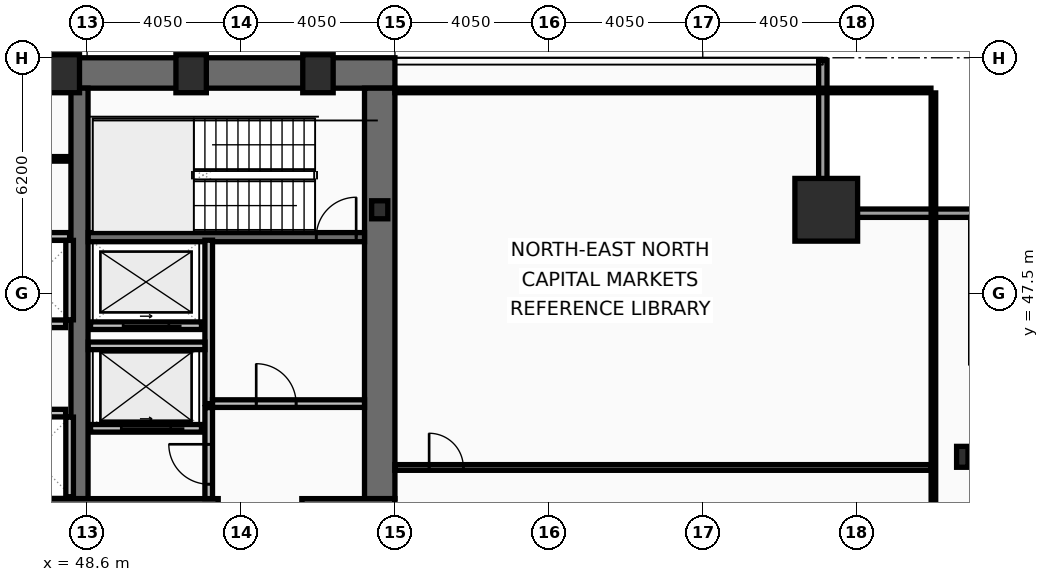
"""IFC4 building model, lengths in metres.
Left out: names, types, materials, properties, quantities, classifications, styles, units other than length and angle.
Written with IfcOpenShell. Run it as: python <this file> out.ifc"""

import sys

from ifc_helpers import new_model, si_unit, direction, frame, frame_2d, origin, origin_2d, place, context, subcontext, project, spatial, rectangle, hollow_rectangle, i_section, extrude, element, fill, save


model = new_model("IFC4")
c1 = context("Model", 3, precision=1e-05, world=origin(), true_north=direction((0.0, 1.0)))
c2 = subcontext(c1, "Body", "Model", "MODEL_VIEW")
j1 = project(units=[si_unit("LENGTHUNIT", "METRE"), si_unit("PLANEANGLEUNIT", "RADIAN")], contexts=[c1])
p1 = place(None, origin())
s1 = spatial("IfcSite", under=j1, at=p1, CompositionType="ELEMENT")
p2 = place(p1, origin())
s2 = spatial("IfcBuilding", under=s1, at=p2, CompositionType="ELEMENT")
p3 = place(p2, frame((0.0, 0.0, 53.8)))
s3 = spatial("IfcBuildingStorey", under=s2, at=p3, CompositionType="ELEMENT", Elevation=53.8)
p4 = place(p3, frame((16.2, 53.3, 0.0), z_axis=(0.0, 0.0, 1.0), x_axis=(1.0, 0.0, 0.0)))
e1 = element("IfcWall", 1, at=p4, inside=s3, PredefinedType="SHEAR", context=c2, shape_type="SweptSolid", body=[
    extrude(rectangle(XDim=40.5, YDim=0.8, at=frame_2d((20.25, 0.0))), origin(), (0.0, 0.0, 1.0), 3.82),
])
p5 = place(p3, frame((56.3, 52.9, 0.0), z_axis=(0.0, 0.0, 1.0), x_axis=(0.0, -1.0, 0.0)))
e2 = element("IfcWall", 2, at=p5, inside=s3, PredefinedType="SHEAR", context=c2, shape_type="SweptSolid", body=[
    extrude(rectangle(XDim=10.8, YDim=0.8, at=frame_2d((5.4, 0.0))), origin(), (0.0, 0.0, 1.0), 3.82),
])
p6 = place(p3, frame((48.4, 42.1, 0.0), z_axis=(0.0, 0.0, 1.0), x_axis=(0.0, 1.0, 0.0)))
e3 = element("IfcWall", 3, at=p6, inside=s3, PredefinedType="SHEAR", context=c2, shape_type="SweptSolid", body=[
    extrude(rectangle(XDim=10.8, YDim=0.45, at=frame_2d((5.4, 0.0))), origin(), (0.0, 0.0, 1.0), 3.82),
])
p7 = place(p3, frame((52.05, 41.7, 0.0), z_axis=(0.0, 0.0, 1.0), x_axis=(-1.0, 0.0, 0.0)))
e4 = element("IfcWall", 4, at=p7, inside=s3, PredefinedType="SHEAR", context=c2, shape_type="SweptSolid", body=[
    extrude(rectangle(XDim=11.3, YDim=0.8, at=frame_2d((5.65, 0.0))), origin(), (0.0, 0.0, 1.0), 3.82),
])
p8 = place(p3, frame((56.7, 41.7, 0.0), z_axis=(0.0, 0.0, 1.0), x_axis=(-1.0, 0.0, 0.0)))
e5 = element("IfcWall", 5, at=p8, inside=s3, PredefinedType="SHEAR", context=c2, shape_type="SweptSolid", body=[
    extrude(rectangle(XDim=2.45, YDim=0.8, at=frame_2d((1.225, 0.0))), origin(), (0.0, 0.0, 1.0), 3.82),
])
p9 = place(p3, frame((48.63, 48.98, 0.0), z_axis=(0.0, 0.0, 1.0), x_axis=(1.0, 0.0, 0.0)))
e6 = element("IfcWall", 6, at=p9, inside=s3, PredefinedType="SHEAR", context=c2, shape_type="SweptSolid", body=[
    extrude(rectangle(XDim=7.27, YDim=0.24, at=frame_2d((3.635, 0.0))), origin(), (0.0, 0.0, 1.0), 3.82),
])
p10 = place(p9, frame((6.0, 0.0, 0.0)))
e7 = element("IfcOpeningElement", 7, at=p10, cuts=e6, PredefinedType="OPENING", context=c2, shape_type="SweptSolid", body=[
    extrude(rectangle(XDim=1.05, YDim=2.15, at=frame_2d((0.525, 1.075))), frame((0.0, 0.13, 0.0), z_axis=(0.0, -1.0, 0.0), x_axis=(1.0, 0.0, 0.0)), (0.0, 0.0, 1.0), 0.26),
])
p11 = place(p3, frame((68.05, 49.7, 0.0), z_axis=(0.0, 0.0, 1.0), x_axis=(1.0, 0.0, 0.0)))
e8 = element("IfcColumn", 8, at=p11, inside=s3, PredefinedType="COLUMN", context=c2, shape_type="SweptSolid", body=[
    extrude(hollow_rectangle(XDim=1.65, YDim=1.65, WallThickness=0.075, at=origin_2d()), origin(), (0.0, 0.0, 1.0), 4.0),
])
for number, where, z_axis, x_axis in (
    (9, (48.0, 53.28, 0.0), (0.0, 0.0, 1.0), (1.0, 0.0, 0.0)),
    (10, (51.337, 53.28, 0.0), (0.0, 0.0, 1.0), (1.0, 0.0, 0.0)),
    (11, (54.675, 53.28, 0.0), (0.0, 0.0, 1.0), (1.0, 0.0, 0.0)),
):
    element("IfcColumn", number, at=place(p3, frame(where, z_axis=z_axis, x_axis=x_axis)), inside=s3, PredefinedType="COLUMN", context=c2, shape_type="SweptSolid", body=[
        extrude(hollow_rectangle(XDim=0.8, YDim=1.0, WallThickness=0.055, at=origin_2d()), origin(), (0.0, 0.0, 1.0), 4.0),
    ])
p12 = place(p3, frame((71.63, 43.2, 0.0), z_axis=(0.0, 0.0, 1.0), x_axis=(1.0, 0.0, 0.0)))
e12 = element("IfcColumn", 12, at=p12, inside=s3, PredefinedType="COLUMN", context=c2, shape_type="SweptSolid", body=[
    extrude(i_section(OverallWidth=0.3, OverallDepth=0.55, WebThickness=0.015, FlangeThickness=0.029, at=origin_2d()), origin(), (0.0, 0.0, 1.0), 4.0),
])
p13 = place(p3, frame((56.3, 49.7, 0.0), z_axis=(0.0, 0.0, 1.0), x_axis=(1.0, 0.0, 0.0)))
e13 = element("IfcColumn", 13, at=p13, inside=s3, PredefinedType="COLUMN", context=c2, shape_type="SweptSolid", body=[
    extrude(i_section(OverallWidth=0.424, OverallDepth=0.474, WebThickness=0.048, FlangeThickness=0.077, at=origin_2d()), origin(), (0.0, 0.0, 1.0), 4.0),
])
p14 = place(p3, frame((67.96, 53.63, 0.0), z_axis=(0.0, 0.0, 1.0), x_axis=(0.0, -1.0, 0.0)))
e14 = element("IfcWall", 14, at=p14, inside=s3, PredefinedType="SOLIDWALL", context=c2, shape_type="SweptSolid", body=[
    extrude(rectangle(XDim=3.91, YDim=0.22, at=frame_2d((1.955, 0.0))), origin(), (0.0, 0.0, 1.0), 3.16),
])
p15 = place(p3, frame((67.85, 49.61, 0.0), z_axis=(0.0, 0.0, 1.0), x_axis=(1.0, 0.0, 0.0)))
e15 = element("IfcWall", 15, at=p15, inside=s3, PredefinedType="SOLIDWALL", context=c2, shape_type="SweptSolid", body=[
    extrude(rectangle(XDim=4.22, YDim=0.22, at=frame_2d((2.11, 0.0))), origin(), (0.0, 0.0, 1.0), 3.16),
])
p16 = place(p3, frame((51.61, 43.95, 0.0), z_axis=(0.0, 0.0, 1.0), x_axis=(-1.0, 0.0, 0.0)))
e16 = element("IfcWall", 16, at=p16, inside=s3, PredefinedType="PARTITIONING", context=c2, shape_type="SweptSolid", body=[
    extrude(rectangle(XDim=2.92, YDim=0.2, at=frame_2d((1.46, 0.0))), origin(), (0.0, 0.0, 1.0), 3.82),
])
p17 = place(p16, frame((0.81, 0.0, 0.0)))
e17 = element("IfcOpeningElement", 17, at=p17, cuts=e16, PredefinedType="OPENING", context=c2, shape_type="SweptSolid", body=[
    extrude(rectangle(XDim=1.3, YDim=2.18, at=frame_2d((0.65, 1.09))), frame((0.0, 0.11, 0.0), z_axis=(0.0, -1.0, 0.0), x_axis=(1.0, 0.0, 0.0)), (0.0, 0.0, 1.0), 0.22),
])
p18 = place(p3, frame((51.61, 46.65, 0.0), z_axis=(0.0, 0.0, 1.0), x_axis=(-1.0, 0.0, 0.0)))
e18 = element("IfcWall", 18, at=p18, inside=s3, PredefinedType="PARTITIONING", context=c2, shape_type="SweptSolid", body=[
    extrude(rectangle(XDim=2.92, YDim=0.2, at=frame_2d((1.46, 0.0))), origin(), (0.0, 0.0, 1.0), 3.82),
])
p19 = place(p18, frame((0.86, 0.0, 0.0)))
e19 = element("IfcOpeningElement", 19, at=p19, cuts=e18, PredefinedType="OPENING", context=c2, shape_type="SweptSolid", body=[
    extrude(rectangle(XDim=1.2, YDim=2.18, at=frame_2d((0.6, 1.09))), frame((0.0, 0.11, 0.0), z_axis=(0.0, -1.0, 0.0), x_axis=(1.0, 0.0, 0.0)), (0.0, 0.0, 1.0), 0.22),
])
p20 = place(p3, frame((51.8, 44.6, 0.0), z_axis=(0.0, 0.0, 1.0), x_axis=(0.0, 1.0, 0.0)))
e20 = element("IfcWall", 20, at=p20, inside=s3, PredefinedType="PARTITIONING", context=c2, shape_type="SweptSolid", body=[
    extrude(rectangle(XDim=4.3, YDim=0.2, at=frame_2d((2.15, 0.0))), origin(), (0.0, 0.0, 1.0), 3.82),
])
p21 = place(p3, frame((51.9, 44.6, 0.0), z_axis=(0.0, 0.0, 1.0), x_axis=(1.0, 0.0, 0.0)))
e21 = element("IfcWall", 21, at=p21, inside=s3, PredefinedType="PARTITIONING", context=c2, shape_type="SweptSolid", body=[
    extrude(rectangle(XDim=4.0, YDim=0.2, at=frame_2d((2.0, 0.0))), origin(), (0.0, 0.0, 1.0), 3.82),
])
p22 = place(p21, frame((1.15, 0.0, 0.0)))
e22 = element("IfcOpeningElement", 22, at=p22, cuts=e21, PredefinedType="OPENING", context=c2, shape_type="SweptSolid", body=[
    extrude(rectangle(XDim=1.05, YDim=2.15, at=frame_2d((0.525, 1.075))), frame((0.0, 0.11, 0.0), z_axis=(0.0, -1.0, 0.0), x_axis=(1.0, 0.0, 0.0)), (0.0, 0.0, 1.0), 0.22),
])
p23 = place(p3, frame((48.63, 46.12, 0.0), z_axis=(0.0, 0.0, 1.0), x_axis=(1.0, 0.0, 0.0)))
e23 = element("IfcWall", 23, at=p23, inside=s3, PredefinedType="PARTITIONING", context=c2, shape_type="SweptSolid", body=[
    extrude(rectangle(XDim=3.07, YDim=0.2, at=frame_2d((1.535, 0.0))), origin(), (0.0, 0.0, 1.0), 3.82),
])
p24 = place(p3, frame((51.8, 42.1, 0.0), z_axis=(0.0, 0.0, 1.0), x_axis=(0.0, 1.0, 0.0)))
e24 = element("IfcWall", 24, at=p24, inside=s3, PredefinedType="PARTITIONING", context=c2, shape_type="SweptSolid", body=[
    extrude(rectangle(XDim=2.395, YDim=0.2, at=frame_2d((1.198, 0.0))), origin(), (0.0, 0.0, 1.0), 3.82),
])
p25 = place(p24, frame((0.38, 0.0, 0.0)))
e25 = element("IfcOpeningElement", 25, at=p25, cuts=e24, PredefinedType="OPENING", context=c2, shape_type="SweptSolid", body=[
    extrude(rectangle(XDim=1.05, YDim=2.15, at=frame_2d((0.525, 1.075))), frame((0.0, 0.11, 0.0), z_axis=(0.0, -1.0, 0.0), x_axis=(1.0, 0.0, 0.0)), (0.0, 0.0, 1.0), 0.22),
])
p26 = place(p3, frame((41.825, 46.7, 0.0), z_axis=(0.0, 0.0, 1.0), x_axis=(1.0, 0.0, 0.0)))
e26 = element("IfcWall", 26, at=p26, inside=s3, PredefinedType="PARTITIONING", context=c2, shape_type="SweptSolid", body=[
    extrude(rectangle(XDim=6.21, YDim=0.2, at=frame_2d((3.105, 0.0))), origin(), (0.0, 0.0, 1.0), 3.82),
])
p27 = place(p3, frame((48.14, 46.805, 0.0), z_axis=(0.0, 0.0, 1.0), x_axis=(0.0, 1.0, 0.0)))
e27 = element("IfcWall", 27, at=p27, inside=s3, PredefinedType="PARTITIONING", context=c2, shape_type="SweptSolid", body=[
    extrude(rectangle(XDim=2.09, YDim=0.2, at=frame_2d((1.045, 0.0))), origin(), (0.0, 0.0, 1.0), 3.82),
])
p28 = place(p3, frame((41.825, 44.35, 0.0), z_axis=(0.0, 0.0, 1.0), x_axis=(1.0, 0.0, 0.0)))
e28 = element("IfcWall", 28, at=p28, inside=s3, PredefinedType="PARTITIONING", context=c2, shape_type="SweptSolid", body=[
    extrude(rectangle(XDim=6.21, YDim=0.2, at=frame_2d((3.105, 0.0))), origin(), (0.0, 0.0, 1.0), 3.82),
])
p29 = place(p3, frame((48.14, 42.15, 0.0), z_axis=(0.0, 0.0, 1.0), x_axis=(0.0, 1.0, 0.0)))
e29 = element("IfcWall", 29, at=p29, inside=s3, PredefinedType="PARTITIONING", context=c2, shape_type="SweptSolid", body=[
    extrude(rectangle(XDim=2.095, YDim=0.2, at=frame_2d((1.048, 0.0))), origin(), (0.0, 0.0, 1.0), 3.82),
])
p30 = place(p3, frame((40.58, 52.86, 0.0), z_axis=(0.0, 0.0, 1.0), x_axis=(1.0, 0.0, 0.0)))
e30 = element("IfcWall", 30, at=p30, inside=s3, PredefinedType="PARTITIONING", context=c2, shape_type="SweptSolid", body=[
    extrude(rectangle(XDim=7.56, YDim=0.12, at=frame_2d((3.78, 0.0))), origin(), (0.0, 0.0, 1.0), 3.82),
])
p31 = place(p3, frame((40.58, 49.0, 0.0), z_axis=(0.0, 0.0, 1.0), x_axis=(1.0, 0.0, 0.0)))
e31 = element("IfcWall", 31, at=p31, inside=s3, PredefinedType="PARTITIONING", context=c2, shape_type="SweptSolid", body=[
    extrude(rectangle(XDim=7.56, YDim=0.2, at=frame_2d((3.78, 0.0))), origin(), (0.0, 0.0, 1.0), 3.82),
])
p32 = place(p31, frame((0.16, 0.0, 0.0)))
e32 = element("IfcOpeningElement", 32, at=p32, cuts=e31, PredefinedType="OPENING", context=c2, shape_type="SweptSolid", body=[
    extrude(rectangle(XDim=0.95, YDim=2.1, at=frame_2d((0.475, 1.05))), frame((0.0, 0.11, 0.0), z_axis=(0.0, -1.0, 0.0), x_axis=(1.0, 0.0, 0.0)), (0.0, 0.0, 1.0), 0.22),
])
p33 = place(p3, frame((40.63, 51.04, 0.0), z_axis=(0.0, 0.0, 1.0), x_axis=(1.0, 0.0, 0.0)))
e33 = element("IfcWall", 33, at=p33, inside=s3, PredefinedType="PARTITIONING", context=c2, shape_type="SweptSolid", body=[
    extrude(rectangle(XDim=7.46, YDim=0.12, at=frame_2d((3.73, 0.0))), origin(), (0.0, 0.0, 1.0), 3.82),
])
p34 = place(p33, frame((2.4, 0.0, 0.0)))
e34 = element("IfcOpeningElement", 34, at=p34, cuts=e33, PredefinedType="OPENING", context=c2, shape_type="SweptSolid", body=[
    extrude(rectangle(XDim=0.9, YDim=2.05, at=frame_2d((0.45, 1.025))), frame((0.0, 0.07, 0.0), z_axis=(0.0, -1.0, 0.0), x_axis=(1.0, 0.0, 0.0)), (0.0, 0.0, 1.0), 0.14),
])
p35 = place(p3, frame((56.7, 42.92, 0.0), z_axis=(0.0, 0.0, 1.0), x_axis=(1.0, 0.0, 0.0)))
e35 = element("IfcWall", 35, at=p35, inside=s3, PredefinedType="PARTITIONING", context=c2, shape_type="SweptSolid", body=[
    extrude(rectangle(XDim=14.105, YDim=0.15, at=frame_2d((7.052, 0.0))), origin(), (0.0, 0.0, 1.0), 3.01),
])
p36 = place(p35, frame((0.9, 0.0, 0.0)))
e36 = element("IfcOpeningElement", 36, at=p36, cuts=e35, PredefinedType="OPENING", context=c2, shape_type="SweptSolid", body=[
    extrude(rectangle(XDim=0.9, YDim=2.05, at=frame_2d((0.45, 1.025))), frame((0.0, 0.085, 0.0), z_axis=(0.0, -1.0, 0.0), x_axis=(1.0, 0.0, 0.0)), (0.0, 0.0, 1.0), 0.17),
])
p37 = place(p3, frame((70.87, 10.665, 0.0), z_axis=(0.0, 0.0, 1.0), x_axis=(0.0, 1.0, 0.0)))
e37 = element("IfcWall", 37, at=p37, inside=s3, PredefinedType="PARTITIONING", context=c2, shape_type="SweptSolid", body=[
    extrude(rectangle(XDim=42.11, YDim=0.12, at=frame_2d((21.055, 0.0))), origin(), (0.0, 0.0, 1.0), 3.01),
])
p38 = place(p3, frame((56.7, 52.84, 0.0), z_axis=(0.0, 0.0, 1.0), x_axis=(1.0, 0.0, 0.0)))
e38 = element("IfcWall", 38, at=p38, inside=s3, PredefinedType="PARTITIONING", context=c2, shape_type="SweptSolid", body=[
    extrude(rectangle(XDim=14.105, YDim=0.12, at=frame_2d((7.052, 0.0))), origin(), (0.0, 0.0, 1.0), 3.82),
])
p39 = place(p10, origin())
e39 = element("IfcDoor", 39, at=p39, inside=s3, OperationType="SINGLE_SWING_RIGHT", PredefinedType="DOOR", context=c2, shape_type="SweptSolid", body=[
    extrude(rectangle(XDim=1.05, YDim=2.15, at=frame_2d((0.525, 1.075))), frame((0.0, 0.025, 0.0), z_axis=(0.0, -1.0, 0.0), x_axis=(1.0, 0.0, 0.0)), (0.0, 0.0, 1.0), 0.05),
])
fill(e7, e39)
p40 = place(p17, origin())
e40 = element("IfcDoor", 40, at=p40, inside=s3, OperationType="SLIDING_TO_LEFT", PredefinedType="DOOR", context=c2, shape_type="SweptSolid", body=[
    extrude(rectangle(XDim=1.3, YDim=2.18, at=frame_2d((0.65, 1.09))), frame((0.0, 0.025, 0.0), z_axis=(0.0, -1.0, 0.0), x_axis=(1.0, 0.0, 0.0)), (0.0, 0.0, 1.0), 0.05),
])
fill(e17, e40)
p41 = place(p19, origin())
e41 = element("IfcDoor", 41, at=p41, inside=s3, OperationType="SLIDING_TO_LEFT", PredefinedType="DOOR", context=c2, shape_type="SweptSolid", body=[
    extrude(rectangle(XDim=1.2, YDim=2.18, at=frame_2d((0.6, 1.09))), frame((0.0, 0.025, 0.0), z_axis=(0.0, -1.0, 0.0), x_axis=(1.0, 0.0, 0.0)), (0.0, 0.0, 1.0), 0.05),
])
fill(e19, e41)
p42 = place(p22, origin())
e42 = element("IfcDoor", 42, at=p42, inside=s3, OperationType="SINGLE_SWING_LEFT", PredefinedType="DOOR", context=c2, shape_type="SweptSolid", body=[
    extrude(rectangle(XDim=1.05, YDim=2.15, at=frame_2d((0.525, 1.075))), frame((0.0, 0.025, 0.0), z_axis=(0.0, -1.0, 0.0), x_axis=(1.0, 0.0, 0.0)), (0.0, 0.0, 1.0), 0.05),
])
fill(e22, e42)
p43 = place(p25, origin())
e43 = element("IfcDoor", 43, at=p43, inside=s3, OperationType="SINGLE_SWING_RIGHT", PredefinedType="DOOR", context=c2, shape_type="SweptSolid", body=[
    extrude(rectangle(XDim=1.05, YDim=2.15, at=frame_2d((0.525, 1.075))), frame((0.0, 0.025, 0.0), z_axis=(0.0, -1.0, 0.0), x_axis=(1.0, 0.0, 0.0)), (0.0, 0.0, 1.0), 0.05),
])
fill(e25, e43)
p44 = place(p36, origin())
e44 = element("IfcDoor", 44, at=p44, inside=s3, OperationType="SINGLE_SWING_LEFT", PredefinedType="DOOR", context=c2, shape_type="SweptSolid", body=[
    extrude(rectangle(XDim=0.9, YDim=2.05, at=frame_2d((0.45, 1.025))), frame((0.0, 0.025, 0.0), z_axis=(0.0, -1.0, 0.0), x_axis=(1.0, 0.0, 0.0)), (0.0, 0.0, 1.0), 0.05),
])
fill(e36, e44)
save(model, sys.argv[1])
